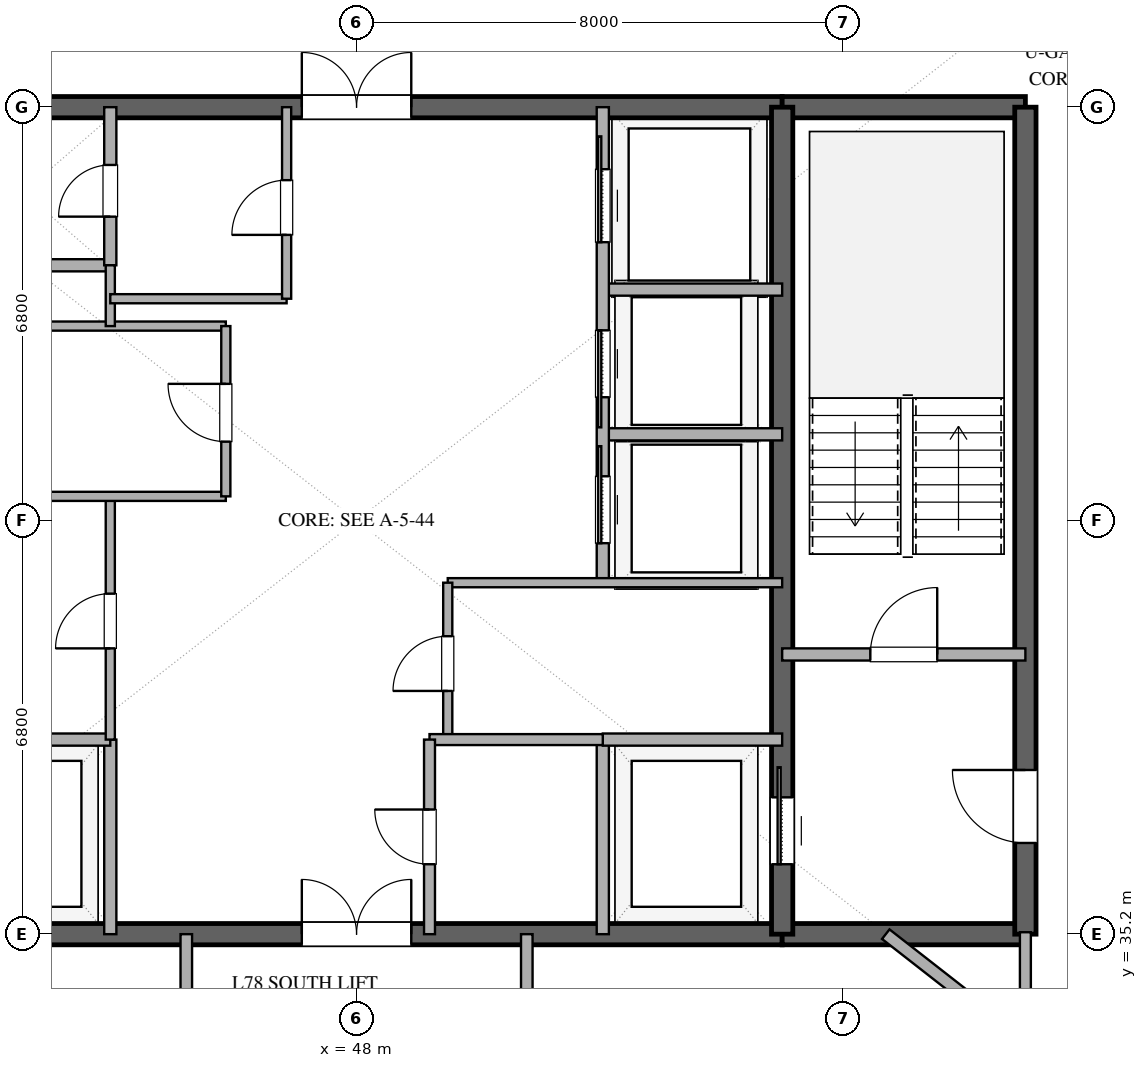
"""IFC4 building model, lengths in metres.
Left out: names, types, materials, properties, quantities, classifications, styles, units other than length and angle.
Written with IfcOpenShell. Run it as: python <this file> out.ifc"""

import sys

from ifc_helpers import new_model, si_unit, direction, frame, frame_2d, origin, place, context, subcontext, project, spatial, rectangle, extrude, element, fill, save


model = new_model("IFC4")
c1 = context("Model", 3, precision=1e-05, world=origin(), true_north=direction((0.0, 1.0)))
c2 = subcontext(c1, "Body", "Model", "MODEL_VIEW")
j1 = project(units=[si_unit("LENGTHUNIT", "METRE"), si_unit("PLANEANGLEUNIT", "RADIAN")], contexts=[c1])
p1 = place(None, origin())
s1 = spatial("IfcSite", under=j1, at=p1, CompositionType="ELEMENT")
p2 = place(p1, origin())
s2 = spatial("IfcBuilding", under=s1, at=p2, CompositionType="ELEMENT")
p3 = place(p2, frame((0.0, 0.0, 301.8)))
s3 = spatial("IfcBuildingStorey", under=s2, at=p3, CompositionType="ELEMENT", Elevation=301.8)
p4 = place(p3, frame((41.0, 35.2, 0.0), z_axis=(0.0, 0.0, 1.0), x_axis=(1.0, 0.0, 0.0)))
e1 = element("IfcWall", 1, at=p4, inside=s3, PredefinedType="SHEAR", context=c2, shape_type="SweptSolid", body=[
    extrude(rectangle(XDim=14.0, YDim=0.35, at=frame_2d((7.0, 0.0))), origin(), (0.0, 0.0, 1.0), 3.37),
])
p5 = place(p4, frame((6.1, 0.0, 0.0)))
e2 = element("IfcOpeningElement", 2, at=p5, cuts=e1, PredefinedType="OPENING", context=c2, shape_type="SweptSolid", body=[
    extrude(rectangle(XDim=1.8, YDim=2.25, at=frame_2d((0.9, 1.125))), frame((0.0, 0.185, 0.0), z_axis=(0.0, -1.0, 0.0), x_axis=(1.0, 0.0, 0.0)), (0.0, 0.0, 1.0), 0.37),
])
p6 = place(p3, frame((55.0, 35.2, 0.0), z_axis=(0.0, 0.0, 1.0), x_axis=(1.0, 0.0, 0.0)))
e3 = element("IfcWall", 3, at=p6, inside=s3, PredefinedType="SHEAR", context=c2, shape_type="SweptSolid", body=[
    extrude(rectangle(XDim=4.0, YDim=0.35, at=frame_2d((2.0, 0.0))), origin(), (0.0, 0.0, 1.0), 3.37),
])
p7 = place(p3, frame((41.0, 48.8, 0.0), z_axis=(0.0, 0.0, 1.0), x_axis=(1.0, 0.0, 0.0)))
e4 = element("IfcWall", 4, at=p7, inside=s3, PredefinedType="SHEAR", context=c2, shape_type="SweptSolid", body=[
    extrude(rectangle(XDim=14.0, YDim=0.35, at=frame_2d((7.0, 0.0))), origin(), (0.0, 0.0, 1.0), 3.37),
])
p8 = place(p7, frame((6.1, 0.0, 0.0)))
e5 = element("IfcOpeningElement", 5, at=p8, cuts=e4, PredefinedType="OPENING", context=c2, shape_type="SweptSolid", body=[
    extrude(rectangle(XDim=1.8, YDim=2.25, at=frame_2d((0.9, 1.125))), frame((0.0, 0.185, 0.0), z_axis=(0.0, -1.0, 0.0), x_axis=(1.0, 0.0, 0.0)), (0.0, 0.0, 1.0), 0.37),
])
p9 = place(p3, frame((55.0, 48.8, 0.0), z_axis=(0.0, 0.0, 1.0), x_axis=(1.0, 0.0, 0.0)))
e6 = element("IfcWall", 6, at=p9, inside=s3, PredefinedType="SHEAR", context=c2, shape_type="SweptSolid", body=[
    extrude(rectangle(XDim=4.0, YDim=0.35, at=frame_2d((2.0, 0.0))), origin(), (0.0, 0.0, 1.0), 3.37),
])
p10 = place(p3, frame((59.0, 35.2, 0.0), z_axis=(0.0, 0.0, 1.0), x_axis=(0.0, 1.0, 0.0)))
e7 = element("IfcWall", 7, at=p10, inside=s3, PredefinedType="SHEAR", context=c2, shape_type="SweptSolid", body=[
    extrude(rectangle(XDim=13.6, YDim=0.35, at=frame_2d((6.8, 0.0))), origin(), (0.0, 0.0, 1.0), 3.37),
])
p11 = place(p10, frame((1.5, 0.0, 0.0)))
e8 = element("IfcOpeningElement", 8, at=p11, cuts=e7, PredefinedType="OPENING", context=c2, shape_type="SweptSolid", body=[
    extrude(rectangle(XDim=1.2, YDim=2.15, at=frame_2d((0.6, 1.075))), frame((0.0, 0.185, 0.0), z_axis=(0.0, -1.0, 0.0), x_axis=(1.0, 0.0, 0.0)), (0.0, 0.0, 1.0), 0.37),
])
p12 = place(p3, frame((55.0, 35.2, 0.0), z_axis=(0.0, 0.0, 1.0), x_axis=(0.0, 1.0, 0.0)))
e9 = element("IfcWall", 9, at=p12, inside=s3, PredefinedType="SHEAR", context=c2, shape_type="SweptSolid", body=[
    extrude(rectangle(XDim=13.6, YDim=0.35, at=frame_2d((6.8, 0.0))), origin(), (0.0, 0.0, 1.0), 3.37),
])
p13 = place(p12, frame((1.15, 0.0, 0.0)))
e10 = element("IfcOpeningElement", 10, at=p13, cuts=e9, PredefinedType="OPENING", context=c2, shape_type="SweptSolid", body=[
    extrude(rectangle(XDim=1.1, YDim=2.2, at=frame_2d((0.55, 1.1))), frame((0.0, 0.185, 0.0), z_axis=(0.0, -1.0, 0.0), x_axis=(1.0, 0.0, 0.0)), (0.0, 0.0, 1.0), 0.37),
])
p14 = place(p3, frame((55.0, 39.8, 0.0), z_axis=(0.0, 0.0, 1.0), x_axis=(1.0, 0.0, 0.0)))
e11 = element("IfcWall", 11, at=p14, inside=s3, PredefinedType="SOLIDWALL", context=c2, shape_type="SweptSolid", body=[
    extrude(rectangle(XDim=4.0, YDim=0.2, at=frame_2d((2.0, 0.0))), origin(), (0.0, 0.0, 1.0), 2.73),
])
p15 = place(p14, frame((1.45, 0.0, 0.0)))
e12 = element("IfcOpeningElement", 12, at=p15, cuts=e11, PredefinedType="OPENING", context=c2, shape_type="SweptSolid", body=[
    extrude(rectangle(XDim=1.1, YDim=2.15, at=frame_2d((0.55, 1.075))), frame((0.0, 0.11, 0.0), z_axis=(0.0, -1.0, 0.0), x_axis=(1.0, 0.0, 0.0)), (0.0, 0.0, 1.0), 0.22),
])
p16 = place(p3, frame((43.95, 35.2, 0.0), z_axis=(0.0, 0.0, 1.0), x_axis=(0.0, 1.0, 0.0)))
e13 = element("IfcWall", 13, at=p16, inside=s3, PredefinedType="SOLIDWALL", context=c2, shape_type="SweptSolid", body=[
    extrude(rectangle(XDim=3.2, YDim=0.2, at=frame_2d((1.6, 0.0))), origin(), (0.0, 0.0, 1.0), 2.73),
])
p17 = place(p3, frame((41.0, 38.4, 0.0), z_axis=(0.0, 0.0, 1.0), x_axis=(1.0, 0.0, 0.0)))
e14 = element("IfcWall", 14, at=p17, inside=s3, PredefinedType="SOLIDWALL", context=c2, shape_type="SweptSolid", body=[
    extrude(rectangle(XDim=2.95, YDim=0.2, at=frame_2d((1.475, 0.0))), origin(), (0.0, 0.0, 1.0), 2.73),
])
p18 = place(p3, frame((52.05, 35.2, 0.0), z_axis=(0.0, 0.0, 1.0), x_axis=(0.0, 1.0, 0.0)))
e15 = element("IfcWall", 15, at=p18, inside=s3, PredefinedType="SOLIDWALL", context=c2, shape_type="SweptSolid", body=[
    extrude(rectangle(XDim=3.2, YDim=0.2, at=frame_2d((1.6, 0.0))), origin(), (0.0, 0.0, 1.0), 2.73),
])
for number, where, z_axis, x_axis in (
    (16, (52.05, 38.4, 0.0), (0.0, 0.0, 1.0), (1.0, 0.0, 0.0)),
    (17, (41.0, 46.2, 0.0), (0.0, 0.0, 1.0), (1.0, 0.0, 0.0)),
):
    element("IfcWall", number, at=place(p3, frame(where, z_axis=z_axis, x_axis=x_axis)), inside=s3, PredefinedType="SOLIDWALL", context=c2, shape_type="SweptSolid", body=[
        extrude(rectangle(XDim=2.95, YDim=0.2, at=frame_2d((1.475, 0.0))), origin(), (0.0, 0.0, 1.0), 2.73),
    ])
p19 = place(p3, frame((43.95, 46.2, 0.0), z_axis=(0.0, 0.0, 1.0), x_axis=(0.0, 1.0, 0.0)))
e18 = element("IfcWall", 18, at=p19, inside=s3, PredefinedType="SOLIDWALL", context=c2, shape_type="SweptSolid", body=[
    extrude(rectangle(XDim=2.6, YDim=0.2, at=frame_2d((1.3, 0.0))), origin(), (0.0, 0.0, 1.0), 2.73),
])
p20 = place(p19, frame((0.8, 0.0, 0.0)))
e19 = element("IfcOpeningElement", 19, at=p20, cuts=e18, PredefinedType="OPENING", context=c2, shape_type="SweptSolid", body=[
    extrude(rectangle(XDim=0.85, YDim=2.15, at=frame_2d((0.425, 1.075))), frame((0.0, 0.11, 0.0), z_axis=(0.0, -1.0, 0.0), x_axis=(1.0, 0.0, 0.0)), (0.0, 0.0, 1.0), 0.22),
])
p21 = place(p3, frame((43.95, 38.4, 0.0), z_axis=(0.0, 0.0, 1.0), x_axis=(0.0, 1.0, 0.0)))
e20 = element("IfcWall", 20, at=p21, inside=s3, PredefinedType="PARTITIONING", context=c2, shape_type="SweptSolid", body=[
    extrude(rectangle(XDim=4.0, YDim=0.15, at=frame_2d((2.0, 0.0))), origin(), (0.0, 0.0, 1.0), 2.73),
])
p22 = place(p21, frame((1.5, 0.0, 0.0)))
e21 = element("IfcOpeningElement", 21, at=p22, cuts=e20, PredefinedType="OPENING", context=c2, shape_type="SweptSolid", body=[
    extrude(rectangle(XDim=0.9, YDim=2.15, at=frame_2d((0.45, 1.075))), frame((0.0, 0.085, 0.0), z_axis=(0.0, -1.0, 0.0), x_axis=(1.0, 0.0, 0.0)), (0.0, 0.0, 1.0), 0.17),
])
for number, where, z_axis, x_axis in (
    (22, (41.0, 42.4, 0.0), (0.0, 0.0, 1.0), (1.0, 0.0, 0.0)),
    (23, (41.0, 45.2, 0.0), (0.0, 0.0, 1.0), (1.0, 0.0, 0.0)),
):
    element("IfcWall", number, at=place(p3, frame(where, z_axis=z_axis, x_axis=x_axis)), inside=s3, PredefinedType="PARTITIONING", context=c2, shape_type="SweptSolid", body=[
        extrude(rectangle(XDim=4.85, YDim=0.15, at=frame_2d((2.425, 0.0))), origin(), (0.0, 0.0, 1.0), 2.73),
    ])
p23 = place(p3, frame((43.95, 45.2, 0.0), z_axis=(0.0, 0.0, 1.0), x_axis=(0.0, 1.0, 0.0)))
e24 = element("IfcWall", 24, at=p23, inside=s3, PredefinedType="PARTITIONING", context=c2, shape_type="SweptSolid", body=[
    extrude(rectangle(XDim=1.0, YDim=0.15, at=frame_2d((0.5, 0.0))), origin(), (0.0, 0.0, 1.0), 2.73),
])
p24 = place(p3, frame((45.85, 42.4, 0.0), z_axis=(0.0, 0.0, 1.0), x_axis=(0.0, 1.0, 0.0)))
e25 = element("IfcWall", 25, at=p24, inside=s3, PredefinedType="PARTITIONING", context=c2, shape_type="SweptSolid", body=[
    extrude(rectangle(XDim=2.8, YDim=0.15, at=frame_2d((1.4, 0.0))), origin(), (0.0, 0.0, 1.0), 2.73),
])
p25 = place(p24, frame((0.9, 0.0, 0.0)))
e26 = element("IfcOpeningElement", 26, at=p25, cuts=e25, PredefinedType="OPENING", context=c2, shape_type="SweptSolid", body=[
    extrude(rectangle(XDim=0.95, YDim=2.15, at=frame_2d((0.475, 1.075))), frame((0.0, 0.085, 0.0), z_axis=(0.0, -1.0, 0.0), x_axis=(1.0, 0.0, 0.0)), (0.0, 0.0, 1.0), 0.17),
])
for number, where, z_axis, x_axis in (
    (27, (52.05, 43.42, 0.0), (0.0, 0.0, 1.0), (1.0, 0.0, 0.0)),
    (28, (52.05, 45.8, 0.0), (0.0, 0.0, 1.0), (1.0, 0.0, 0.0)),
):
    element("IfcWall", number, at=place(p3, frame(where, z_axis=z_axis, x_axis=x_axis)), inside=s3, PredefinedType="SOLIDWALL", context=c2, shape_type="SweptSolid", body=[
        extrude(rectangle(XDim=2.95, YDim=0.2, at=frame_2d((1.475, 0.0))), origin(), (0.0, 0.0, 1.0), 2.73),
    ])
p26 = place(p3, frame((52.05, 40.98, 0.0), z_axis=(0.0, 0.0, 1.0), x_axis=(0.0, 1.0, 0.0)))
e29 = element("IfcWall", 29, at=p26, inside=s3, PredefinedType="SOLIDWALL", context=c2, shape_type="SweptSolid", body=[
    extrude(rectangle(XDim=7.82, YDim=0.2, at=frame_2d((3.91, 0.0))), origin(), (0.0, 0.0, 1.0), 2.73),
])
p27 = place(p26, frame((0.65, 0.0, 0.0)))
e30 = element("IfcOpeningElement", 30, at=p27, cuts=e29, PredefinedType="OPENING", context=c2, shape_type="SweptSolid", body=[
    extrude(rectangle(XDim=1.1, YDim=2.2, at=frame_2d((0.55, 1.1))), frame((0.0, 0.11, 0.0), z_axis=(0.0, -1.0, 0.0), x_axis=(1.0, 0.0, 0.0)), (0.0, 0.0, 1.0), 0.22),
])
p28 = place(p26, frame((3.05, 0.0, 0.0)))
e31 = element("IfcOpeningElement", 31, at=p28, cuts=e29, PredefinedType="OPENING", context=c2, shape_type="SweptSolid", body=[
    extrude(rectangle(XDim=1.1, YDim=2.2, at=frame_2d((0.55, 1.1))), frame((0.0, 0.11, 0.0), z_axis=(0.0, -1.0, 0.0), x_axis=(1.0, 0.0, 0.0)), (0.0, 0.0, 1.0), 0.22),
])
p29 = place(p26, frame((5.6, 0.0, 0.0)))
e32 = element("IfcOpeningElement", 32, at=p29, cuts=e29, PredefinedType="OPENING", context=c2, shape_type="SweptSolid", body=[
    extrude(rectangle(XDim=1.2, YDim=2.2, at=frame_2d((0.6, 1.1))), frame((0.0, 0.11, 0.0), z_axis=(0.0, -1.0, 0.0), x_axis=(1.0, 0.0, 0.0)), (0.0, 0.0, 1.0), 0.22),
])
p30 = place(p3, frame((49.5, 40.98, 0.0), z_axis=(0.0, 0.0, 1.0), x_axis=(1.0, 0.0, 0.0)))
e33 = element("IfcWall", 33, at=p30, inside=s3, PredefinedType="PARTITIONING", context=c2, shape_type="SweptSolid", body=[
    extrude(rectangle(XDim=5.5, YDim=0.15, at=frame_2d((2.75, 0.0))), origin(), (0.0, 0.0, 1.0), 2.73),
])
p31 = place(p3, frame((49.5, 38.4, 0.0), z_axis=(0.0, 0.0, 1.0), x_axis=(0.0, 1.0, 0.0)))
e34 = element("IfcWall", 34, at=p31, inside=s3, PredefinedType="PARTITIONING", context=c2, shape_type="SweptSolid", body=[
    extrude(rectangle(XDim=2.58, YDim=0.15, at=frame_2d((1.29, 0.0))), origin(), (0.0, 0.0, 1.0), 2.73),
])
p32 = place(p31, frame((0.8, 0.0, 0.0)))
e35 = element("IfcOpeningElement", 35, at=p32, cuts=e34, PredefinedType="OPENING", context=c2, shape_type="SweptSolid", body=[
    extrude(rectangle(XDim=0.9, YDim=2.15, at=frame_2d((0.45, 1.075))), frame((0.0, 0.085, 0.0), z_axis=(0.0, -1.0, 0.0), x_axis=(1.0, 0.0, 0.0)), (0.0, 0.0, 1.0), 0.17),
])
p33 = place(p3, frame((43.95, 45.65, 0.0), z_axis=(0.0, 0.0, 1.0), x_axis=(1.0, 0.0, 0.0)))
e36 = element("IfcWall", 36, at=p33, inside=s3, PredefinedType="PARTITIONING", context=c2, shape_type="SweptSolid", body=[
    extrude(rectangle(XDim=2.9, YDim=0.15, at=frame_2d((1.45, 0.0))), origin(), (0.0, 0.0, 1.0), 2.73),
])
p34 = place(p3, frame((46.85, 45.65, 0.0), z_axis=(0.0, 0.0, 1.0), x_axis=(0.0, 1.0, 0.0)))
e37 = element("IfcWall", 37, at=p34, inside=s3, PredefinedType="PARTITIONING", context=c2, shape_type="SweptSolid", body=[
    extrude(rectangle(XDim=3.15, YDim=0.15, at=frame_2d((1.575, 0.0))), origin(), (0.0, 0.0, 1.0), 2.73),
])
p35 = place(p34, frame((1.05, 0.0, 0.0)))
e38 = element("IfcOpeningElement", 38, at=p35, cuts=e37, PredefinedType="OPENING", context=c2, shape_type="SweptSolid", body=[
    extrude(rectangle(XDim=0.9, YDim=2.15, at=frame_2d((0.45, 1.075))), frame((0.0, 0.085, 0.0), z_axis=(0.0, -1.0, 0.0), x_axis=(1.0, 0.0, 0.0)), (0.0, 0.0, 1.0), 0.17),
])
p36 = place(p3, frame((49.2, 38.4, 0.0), z_axis=(0.0, 0.0, 1.0), x_axis=(1.0, 0.0, 0.0)))
e39 = element("IfcWall", 39, at=p36, inside=s3, PredefinedType="PLUMBINGWALL", context=c2, shape_type="SweptSolid", body=[
    extrude(rectangle(XDim=2.85, YDim=0.18, at=frame_2d((1.425, 0.0))), origin(), (0.0, 0.0, 1.0), 2.73),
])
p37 = place(p3, frame((49.2, 35.2, 0.0), z_axis=(0.0, 0.0, 1.0), x_axis=(0.0, 1.0, 0.0)))
e40 = element("IfcWall", 40, at=p37, inside=s3, PredefinedType="PLUMBINGWALL", context=c2, shape_type="SweptSolid", body=[
    extrude(rectangle(XDim=3.2, YDim=0.18, at=frame_2d((1.6, 0.0))), origin(), (0.0, 0.0, 1.0), 2.73),
])
p38 = place(p37, frame((1.15, 0.0, 0.0)))
e41 = element("IfcOpeningElement", 41, at=p38, cuts=e40, PredefinedType="OPENING", context=c2, shape_type="SweptSolid", body=[
    extrude(rectangle(XDim=0.9, YDim=2.1, at=frame_2d((0.45, 1.05))), frame((0.0, 0.1, 0.0), z_axis=(0.0, -1.0, 0.0), x_axis=(1.0, 0.0, 0.0)), (0.0, 0.0, 1.0), 0.2),
])
p39 = place(p3, frame((56.704, 35.2, 0.0), z_axis=(0.0, 0.0, 1.0), x_axis=(0.78802314347, -0.615645616695, 0.0)))
e42 = element("IfcWall", 42, at=p39, inside=s3, PredefinedType="PARTITIONING", context=c2, shape_type="SweptSolid", body=[
    extrude(rectangle(XDim=12.034, YDim=0.2, at=frame_2d((6.017, 0.0))), origin(), (0.0, 0.0, 1.0), 2.73),
])
for number, where, z_axis, x_axis in (
    (43, (50.8, 35.2, 0.0), (0.0, 0.0, 1.0), (0.0, -1.0, 0.0)),
    (44, (45.2, 33.1, 0.0), (0.0, 0.0, 1.0), (0.0, 1.0, 0.0)),
):
    element("IfcWall", number, at=place(p3, frame(where, z_axis=z_axis, x_axis=x_axis)), inside=s3, PredefinedType="PARTITIONING", context=c2, shape_type="SweptSolid", body=[
        extrude(rectangle(XDim=2.1, YDim=0.19, at=frame_2d((1.05, 0.0))), origin(), (0.0, 0.0, 1.0), 2.73),
    ])
p40 = place(p3, frame((59.0, 34.0, 0.0), z_axis=(0.0, 0.0, 1.0), x_axis=(0.0, 1.0, 0.0)))
e45 = element("IfcWall", 45, at=p40, inside=s3, PredefinedType="PLUMBINGWALL", context=c2, shape_type="SweptSolid", body=[
    extrude(rectangle(XDim=1.232, YDim=0.18, at=frame_2d((0.616, 0.0))), origin(), (0.0, 0.0, 1.0), 2.73),
])
p41 = place(p13, origin())
e46 = element("IfcDoor", 46, at=p41, inside=s3, OperationType="SLIDING_TO_RIGHT", PredefinedType="DOOR", context=c2, shape_type="SweptSolid", body=[
    extrude(rectangle(XDim=1.1, YDim=2.2, at=frame_2d((0.55, 1.1))), frame((0.0, 0.025, 0.0), z_axis=(0.0, -1.0, 0.0), x_axis=(1.0, 0.0, 0.0)), (0.0, 0.0, 1.0), 0.05),
])
fill(e10, e46)
p42 = place(p11, origin())
e47 = element("IfcDoor", 47, at=p42, inside=s3, OperationType="SINGLE_SWING_RIGHT", PredefinedType="DOOR", context=c2, shape_type="SweptSolid", body=[
    extrude(rectangle(XDim=1.2, YDim=2.15, at=frame_2d((0.6, 1.075))), frame((0.0, 0.025, 0.0), z_axis=(0.0, -1.0, 0.0), x_axis=(1.0, 0.0, 0.0)), (0.0, 0.0, 1.0), 0.05),
])
fill(e8, e47)
p43 = place(p5, origin())
e48 = element("IfcDoor", 48, at=p43, inside=s3, OperationType="DOUBLE_DOOR_SINGLE_SWING", PredefinedType="DOOR", context=c2, shape_type="SweptSolid", body=[
    extrude(rectangle(XDim=1.8, YDim=2.25, at=frame_2d((0.9, 1.125))), frame((0.0, 0.025, 0.0), z_axis=(0.0, -1.0, 0.0), x_axis=(1.0, 0.0, 0.0)), (0.0, 0.0, 1.0), 0.05),
])
fill(e2, e48)
p44 = place(p8, origin())
e49 = element("IfcDoor", 49, at=p44, inside=s3, OperationType="DOUBLE_DOOR_SINGLE_SWING", PredefinedType="DOOR", context=c2, shape_type="SweptSolid", body=[
    extrude(rectangle(XDim=1.8, YDim=2.25, at=frame_2d((0.9, 1.125))), frame((0.0, 0.025, 0.0), z_axis=(0.0, -1.0, 0.0), x_axis=(1.0, 0.0, 0.0)), (0.0, 0.0, 1.0), 0.05),
])
fill(e5, e49)
p45 = place(p15, origin())
e50 = element("IfcDoor", 50, at=p45, inside=s3, OperationType="SINGLE_SWING_RIGHT", PredefinedType="DOOR", context=c2, shape_type="SweptSolid", body=[
    extrude(rectangle(XDim=1.1, YDim=2.15, at=frame_2d((0.55, 1.075))), frame((0.0, 0.025, 0.0), z_axis=(0.0, -1.0, 0.0), x_axis=(1.0, 0.0, 0.0)), (0.0, 0.0, 1.0), 0.05),
])
fill(e12, e50)
p46 = place(p20, origin())
e51 = element("IfcDoor", 51, at=p46, inside=s3, OperationType="SINGLE_SWING_LEFT", PredefinedType="DOOR", context=c2, shape_type="SweptSolid", body=[
    extrude(rectangle(XDim=0.85, YDim=2.15, at=frame_2d((0.425, 1.075))), frame((0.0, 0.025, 0.0), z_axis=(0.0, -1.0, 0.0), x_axis=(1.0, 0.0, 0.0)), (0.0, 0.0, 1.0), 0.05),
])
fill(e19, e51)
p47 = place(p22, origin())
e52 = element("IfcDoor", 52, at=p47, inside=s3, OperationType="SINGLE_SWING_LEFT", PredefinedType="DOOR", context=c2, shape_type="SweptSolid", body=[
    extrude(rectangle(XDim=0.9, YDim=2.15, at=frame_2d((0.45, 1.075))), frame((0.0, 0.025, 0.0), z_axis=(0.0, -1.0, 0.0), x_axis=(1.0, 0.0, 0.0)), (0.0, 0.0, 1.0), 0.05),
])
fill(e21, e52)
p48 = place(p25, origin())
e53 = element("IfcDoor", 53, at=p48, inside=s3, OperationType="SINGLE_SWING_RIGHT", PredefinedType="DOOR", context=c2, shape_type="SweptSolid", body=[
    extrude(rectangle(XDim=0.95, YDim=2.15, at=frame_2d((0.475, 1.075))), frame((0.0, 0.025, 0.0), z_axis=(0.0, -1.0, 0.0), x_axis=(1.0, 0.0, 0.0)), (0.0, 0.0, 1.0), 0.05),
])
fill(e26, e53)
p49 = place(p27, origin())
e54 = element("IfcDoor", 54, at=p49, inside=s3, OperationType="SLIDING_TO_RIGHT", PredefinedType="DOOR", context=c2, shape_type="SweptSolid", body=[
    extrude(rectangle(XDim=1.1, YDim=2.2, at=frame_2d((0.55, 1.1))), frame((0.0, 0.025, 0.0), z_axis=(0.0, -1.0, 0.0), x_axis=(1.0, 0.0, 0.0)), (0.0, 0.0, 1.0), 0.05),
])
fill(e30, e54)
p50 = place(p28, origin())
e55 = element("IfcDoor", 55, at=p50, inside=s3, OperationType="SLIDING_TO_LEFT", PredefinedType="DOOR", context=c2, shape_type="SweptSolid", body=[
    extrude(rectangle(XDim=1.1, YDim=2.2, at=frame_2d((0.55, 1.1))), frame((0.0, 0.025, 0.0), z_axis=(0.0, -1.0, 0.0), x_axis=(1.0, 0.0, 0.0)), (0.0, 0.0, 1.0), 0.05),
])
fill(e31, e55)
p51 = place(p29, origin())
e56 = element("IfcDoor", 56, at=p51, inside=s3, OperationType="SLIDING_TO_RIGHT", PredefinedType="DOOR", context=c2, shape_type="SweptSolid", body=[
    extrude(rectangle(XDim=1.2, YDim=2.2, at=frame_2d((0.6, 1.1))), frame((0.0, 0.025, 0.0), z_axis=(0.0, -1.0, 0.0), x_axis=(1.0, 0.0, 0.0)), (0.0, 0.0, 1.0), 0.05),
])
fill(e32, e56)
p52 = place(p32, origin())
e57 = element("IfcDoor", 57, at=p52, inside=s3, OperationType="SINGLE_SWING_LEFT", PredefinedType="DOOR", context=c2, shape_type="SweptSolid", body=[
    extrude(rectangle(XDim=0.9, YDim=2.15, at=frame_2d((0.45, 1.075))), frame((0.0, 0.025, 0.0), z_axis=(0.0, -1.0, 0.0), x_axis=(1.0, 0.0, 0.0)), (0.0, 0.0, 1.0), 0.05),
])
fill(e35, e57)
p53 = place(p35, origin())
e58 = element("IfcDoor", 58, at=p53, inside=s3, OperationType="SINGLE_SWING_LEFT", PredefinedType="DOOR", context=c2, shape_type="SweptSolid", body=[
    extrude(rectangle(XDim=0.9, YDim=2.15, at=frame_2d((0.45, 1.075))), frame((0.0, 0.025, 0.0), z_axis=(0.0, -1.0, 0.0), x_axis=(1.0, 0.0, 0.0)), (0.0, 0.0, 1.0), 0.05),
])
fill(e38, e58)
p54 = place(p38, origin())
e59 = element("IfcDoor", 59, at=p54, inside=s3, OperationType="SINGLE_SWING_RIGHT", PredefinedType="DOOR", context=c2, shape_type="SweptSolid", body=[
    extrude(rectangle(XDim=0.9, YDim=2.1, at=frame_2d((0.45, 1.05))), frame((0.0, 0.025, 0.0), z_axis=(0.0, -1.0, 0.0), x_axis=(1.0, 0.0, 0.0)), (0.0, 0.0, 1.0), 0.05),
])
fill(e41, e59)
save(model, sys.argv[1])
